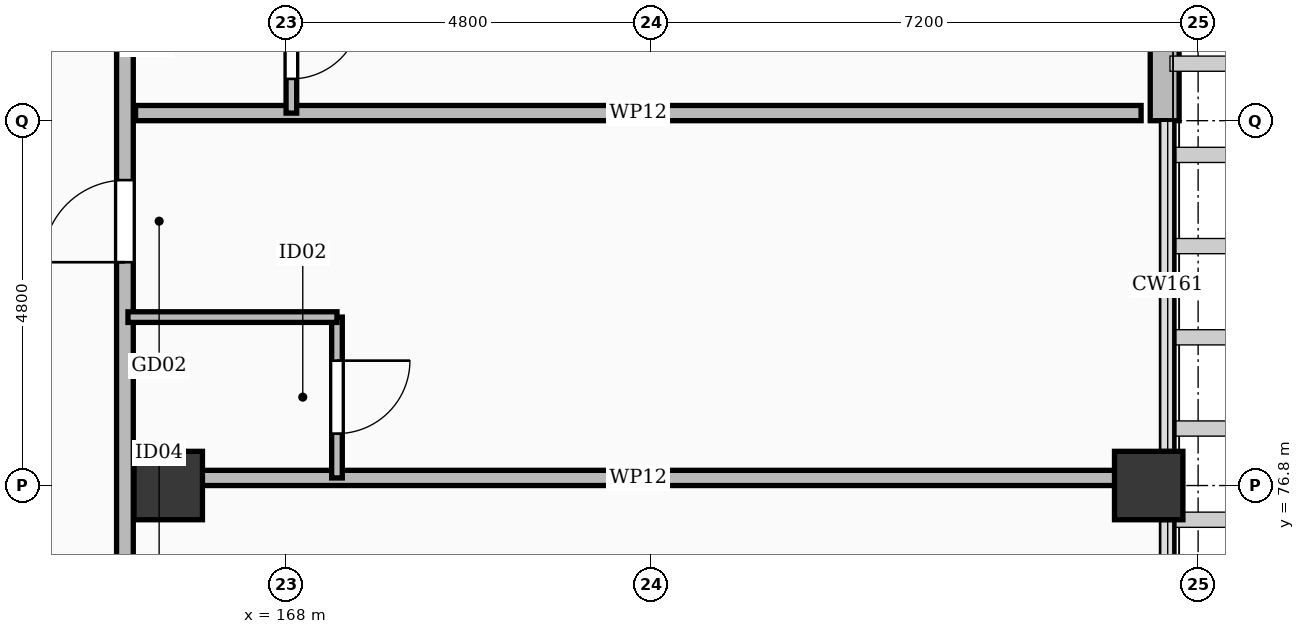
"""IFC4 building model, lengths in metres.
Left out: names, types, materials, properties, quantities, classifications, styles, units other than length and angle.
Written with IfcOpenShell. Run it as: python <this file> out.ifc"""

import sys

from ifc_helpers import new_model, si_unit, direction, frame, frame_2d, origin, origin_2d, place, context, subcontext, project, spatial, rectangle, extrude, element, fill, save


model = new_model("IFC4")
c1 = context("Model", 3, precision=1e-05, world=origin(), true_north=direction((0.0, 1.0)))
c2 = subcontext(c1, "Body", "Model", "MODEL_VIEW")
j1 = project(units=[si_unit("LENGTHUNIT", "METRE"), si_unit("PLANEANGLEUNIT", "RADIAN")], contexts=[c1])
p1 = place(None, origin())
s1 = spatial("IfcSite", under=j1, at=p1, CompositionType="ELEMENT")
p2 = place(p1, origin())
s2 = spatial("IfcBuilding", under=s1, at=p2, CompositionType="ELEMENT")
p3 = place(p2, frame((0.0, 0.0, 16.2)))
s3 = spatial("IfcBuildingStorey", under=s2, at=p3, CompositionType="ELEMENT", Elevation=16.2)
for number, where, z_axis, x_axis in (
    (1, (166.45, 76.8, 0.0), (0.0, 0.0, 1.0), (1.0, 0.0, 0.0)),
    (2, (179.35, 76.8, 0.0), (0.0, 0.0, 1.0), (1.0, 0.0, 0.0)),
):
    element("IfcColumn", number, at=place(p3, frame(where, z_axis=z_axis, x_axis=x_axis)), inside=s3, PredefinedType="COLUMN", context=c2, shape_type="SweptSolid", body=[
        extrude(rectangle(XDim=0.9, YDim=0.9, at=origin_2d()), origin(), (0.0, 0.0, 1.0), 4.8),
    ])
p4 = place(p3, frame((179.56, 85.975, 0.0), z_axis=(0.0, 0.0, 1.0), x_axis=(0.0, -1.0, 0.0)))
e3 = element("IfcWall", 3, at=p4, inside=s3, PredefinedType="SOLIDWALL", context=c2, shape_type="SweptSolid", body=[
    extrude(rectangle(XDim=4.375, YDim=0.38, at=frame_2d((2.188, 0.0))), origin(), (0.0, 0.0, 1.0), 3.032),
])
p5 = place(p4, frame((1.403, 0.0, 0.55)))
e4 = element("IfcOpeningElement", 4, at=p5, cuts=e3, PredefinedType="OPENING", context=c2, shape_type="SweptSolid", body=[
    extrude(rectangle(XDim=1.5, YDim=1.74, at=frame_2d((0.75, 0.87))), frame((0.0, 0.202, 0.0), z_axis=(0.0, -1.0, 0.0), x_axis=(1.0, 0.0, 0.0)), (0.0, 0.0, 1.0), 0.404),
])
p6 = place(p3, frame((165.88, 65.4, 0.0), z_axis=(0.0, 0.0, 1.0), x_axis=(0.0, 1.0, 0.0)))
e5 = element("IfcWall", 5, at=p6, inside=s3, PredefinedType="PARTITIONING", context=c2, shape_type="SweptSolid", body=[
    extrude(rectangle(XDim=60.25, YDim=0.22, at=frame_2d((30.125, 0.0))), origin(), (0.0, 0.0, 1.0), 3.732),
])
p7 = place(p6, frame((4.738, 0.0, 0.0)))
e6 = element("IfcOpeningElement", 6, at=p7, cuts=e5, PredefinedType="OPENING", context=c2, shape_type="SweptSolid", body=[
    extrude(rectangle(XDim=1.28, YDim=2.16, at=frame_2d((0.64, 1.08))), frame((0.0, 0.122, 0.0), z_axis=(0.0, -1.0, 0.0), x_axis=(1.0, 0.0, 0.0)), (0.0, 0.0, 1.0), 0.244),
])
p8 = place(p6, frame((9.405, 0.0, 0.0)))
e7 = element("IfcOpeningElement", 7, at=p8, cuts=e5, PredefinedType="OPENING", context=c2, shape_type="SweptSolid", body=[
    extrude(rectangle(XDim=1.05, YDim=2.18, at=frame_2d((0.525, 1.09))), frame((0.0, 0.122, 0.0), z_axis=(0.0, -1.0, 0.0), x_axis=(1.0, 0.0, 0.0)), (0.0, 0.0, 1.0), 0.244),
])
p9 = place(p6, frame((14.338, 0.0, 0.0)))
e8 = element("IfcOpeningElement", 8, at=p9, cuts=e5, PredefinedType="OPENING", context=c2, shape_type="SweptSolid", body=[
    extrude(rectangle(XDim=1.08, YDim=2.25, at=frame_2d((0.54, 1.125))), frame((0.0, 0.122, 0.0), z_axis=(0.0, -1.0, 0.0), x_axis=(1.0, 0.0, 0.0)), (0.0, 0.0, 1.0), 0.244),
])
p10 = place(p6, frame((19.005, 0.0, 0.0)))
e9 = element("IfcOpeningElement", 9, at=p10, cuts=e5, PredefinedType="OPENING", context=c2, shape_type="SweptSolid", body=[
    extrude(rectangle(XDim=1.02, YDim=2.2, at=frame_2d((0.51, 1.1))), frame((0.0, 0.122, 0.0), z_axis=(0.0, -1.0, 0.0), x_axis=(1.0, 0.0, 0.0)), (0.0, 0.0, 1.0), 0.244),
])
p11 = place(p6, frame((23.938, 0.0, 0.0)))
e10 = element("IfcOpeningElement", 10, at=p11, cuts=e5, PredefinedType="OPENING", context=c2, shape_type="SweptSolid", body=[
    extrude(rectangle(XDim=1.5, YDim=2.3, at=frame_2d((0.75, 1.15))), frame((0.0, 0.122, 0.0), z_axis=(0.0, -1.0, 0.0), x_axis=(1.0, 0.0, 0.0)), (0.0, 0.0, 1.0), 0.244),
])
p12 = place(p6, frame((28.605, 0.0, 0.0)))
e11 = element("IfcOpeningElement", 11, at=p12, cuts=e5, PredefinedType="OPENING", context=c2, shape_type="SweptSolid", body=[
    extrude(rectangle(XDim=1.12, YDim=2.15, at=frame_2d((0.56, 1.075))), frame((0.0, 0.122, 0.0), z_axis=(0.0, -1.0, 0.0), x_axis=(1.0, 0.0, 0.0)), (0.0, 0.0, 1.0), 0.244),
])
p13 = place(p6, frame((33.538, 0.0, 0.0)))
e12 = element("IfcOpeningElement", 12, at=p13, cuts=e5, PredefinedType="OPENING", context=c2, shape_type="SweptSolid", body=[
    extrude(rectangle(XDim=1.28, YDim=2.16, at=frame_2d((0.64, 1.08))), frame((0.0, 0.122, 0.0), z_axis=(0.0, -1.0, 0.0), x_axis=(1.0, 0.0, 0.0)), (0.0, 0.0, 1.0), 0.244),
])
p14 = place(p6, frame((38.205, 0.0, 0.0)))
e13 = element("IfcOpeningElement", 13, at=p14, cuts=e5, PredefinedType="OPENING", context=c2, shape_type="SweptSolid", body=[
    extrude(rectangle(XDim=1.05, YDim=2.18, at=frame_2d((0.525, 1.09))), frame((0.0, 0.122, 0.0), z_axis=(0.0, -1.0, 0.0), x_axis=(1.0, 0.0, 0.0)), (0.0, 0.0, 1.0), 0.244),
])
p15 = place(p6, frame((43.138, 0.0, 0.0)))
e14 = element("IfcOpeningElement", 14, at=p15, cuts=e5, PredefinedType="OPENING", context=c2, shape_type="SweptSolid", body=[
    extrude(rectangle(XDim=1.08, YDim=2.25, at=frame_2d((0.54, 1.125))), frame((0.0, 0.122, 0.0), z_axis=(0.0, -1.0, 0.0), x_axis=(1.0, 0.0, 0.0)), (0.0, 0.0, 1.0), 0.244),
])
p16 = place(p6, frame((47.805, 0.0, 0.0)))
e15 = element("IfcOpeningElement", 15, at=p16, cuts=e5, PredefinedType="OPENING", context=c2, shape_type="SweptSolid", body=[
    extrude(rectangle(XDim=1.02, YDim=2.2, at=frame_2d((0.51, 1.1))), frame((0.0, 0.122, 0.0), z_axis=(0.0, -1.0, 0.0), x_axis=(1.0, 0.0, 0.0)), (0.0, 0.0, 1.0), 0.244),
])
p17 = place(p6, frame((52.738, 0.0, 0.0)))
e16 = element("IfcOpeningElement", 16, at=p17, cuts=e5, PredefinedType="OPENING", context=c2, shape_type="SweptSolid", body=[
    extrude(rectangle(XDim=1.5, YDim=2.3, at=frame_2d((0.75, 1.15))), frame((0.0, 0.122, 0.0), z_axis=(0.0, -1.0, 0.0), x_axis=(1.0, 0.0, 0.0)), (0.0, 0.0, 1.0), 0.244),
])
p18 = place(p6, frame((57.405, 0.0, 0.0)))
e17 = element("IfcOpeningElement", 17, at=p18, cuts=e5, PredefinedType="OPENING", context=c2, shape_type="SweptSolid", body=[
    extrude(rectangle(XDim=1.12, YDim=2.15, at=frame_2d((0.56, 1.075))), frame((0.0, 0.122, 0.0), z_axis=(0.0, -1.0, 0.0), x_axis=(1.0, 0.0, 0.0)), (0.0, 0.0, 1.0), 0.244),
])
p19 = place(p3, frame((166.02, 76.9, 0.0), z_axis=(0.0, 0.0, 1.0), x_axis=(1.0, 0.0, 0.0)))
e18 = element("IfcWall", 18, at=p19, inside=s3, PredefinedType="PARTITIONING", context=c2, shape_type="SweptSolid", body=[
    extrude(rectangle(XDim=13.23, YDim=0.2, at=frame_2d((6.615, 0.0))), origin(), (0.0, 0.0, 1.0), 3.032),
])
p20 = place(p3, frame((168.67, 76.9, 0.0), z_axis=(0.0, 0.0, 1.0), x_axis=(0.0, 1.0, 0.0)))
e19 = element("IfcWall", 19, at=p20, inside=s3, PredefinedType="PARTITIONING", context=c2, shape_type="SweptSolid", body=[
    extrude(rectangle(XDim=2.116, YDim=0.14, at=frame_2d((1.058, 0.0))), origin(), (0.0, 0.0, 1.0), 3.732),
])
p21 = place(p20, frame((0.583, 0.0, 0.0)))
e20 = element("IfcOpeningElement", 20, at=p21, cuts=e19, PredefinedType="OPENING", context=c2, shape_type="SweptSolid", body=[
    extrude(rectangle(XDim=0.96, YDim=2.12, at=frame_2d((0.48, 1.06))), frame((0.0, 0.082, 0.0), z_axis=(0.0, -1.0, 0.0), x_axis=(1.0, 0.0, 0.0)), (0.0, 0.0, 1.0), 0.164),
])
p22 = place(p3, frame((165.92, 79.016, 0.0), z_axis=(0.0, 0.0, 1.0), x_axis=(1.0, 0.0, 0.0)))
e21 = element("IfcWall", 21, at=p22, inside=s3, PredefinedType="PARTITIONING", context=c2, shape_type="SweptSolid", body=[
    extrude(rectangle(XDim=2.75, YDim=0.14, at=frame_2d((1.375, 0.0))), origin(), (0.0, 0.0, 1.0), 3.132),
])
p23 = place(p3, frame((166.02, 81.7, 0.0), z_axis=(0.0, 0.0, 1.0), x_axis=(1.0, 0.0, 0.0)))
e22 = element("IfcWall", 22, at=p23, inside=s3, PredefinedType="PARTITIONING", context=c2, shape_type="SweptSolid", body=[
    extrude(rectangle(XDim=13.23, YDim=0.2, at=frame_2d((6.615, 0.0))), origin(), (0.0, 0.0, 1.0), 3.032),
])
p24 = place(p3, frame((168.07, 81.7, 0.0), z_axis=(0.0, 0.0, 1.0), x_axis=(0.0, 1.0, 0.0)))
e23 = element("IfcWall", 23, at=p24, inside=s3, PredefinedType="PARTITIONING", context=c2, shape_type="SweptSolid", body=[
    extrude(rectangle(XDim=1.85, YDim=0.14, at=frame_2d((0.925, 0.0))), origin(), (0.0, 0.0, 1.0), 4.54),
])
p25 = place(p24, frame((0.45, 0.0, 0.0)))
e24 = element("IfcOpeningElement", 24, at=p25, cuts=e23, PredefinedType="OPENING", context=c2, shape_type="SweptSolid", body=[
    extrude(rectangle(XDim=0.92, YDim=2.1, at=frame_2d((0.46, 1.05))), frame((0.0, 0.082, 0.0), z_axis=(0.0, -1.0, 0.0), x_axis=(1.0, 0.0, 0.0)), (0.0, 0.0, 1.0), 0.164),
])
p26 = place(p9, origin())
e25 = element("IfcDoor", 25, at=p26, inside=s3, OperationType="SINGLE_SWING_LEFT", PredefinedType="DOOR", context=c2, shape_type="SweptSolid", body=[
    extrude(rectangle(XDim=1.08, YDim=2.25, at=frame_2d((0.54, 1.125))), frame((0.0, 0.025, 0.0), z_axis=(0.0, -1.0, 0.0), x_axis=(1.0, 0.0, 0.0)), (0.0, 0.0, 1.0), 0.05),
])
fill(e8, e25)
p27 = place(p21, frame((0.96, 0.0, 0.0), z_axis=(0.0, 0.0, 1.0), x_axis=(-1.0, 0.0, 0.0)))
e26 = element("IfcDoor", 26, at=p27, inside=s3, OperationType="SINGLE_SWING_RIGHT", PredefinedType="DOOR", context=c2, shape_type="SweptSolid", body=[
    extrude(rectangle(XDim=0.96, YDim=2.12, at=frame_2d((0.48, 1.06))), frame((0.0, 0.025, 0.0), z_axis=(0.0, -1.0, 0.0), x_axis=(1.0, 0.0, 0.0)), (0.0, 0.0, 1.0), 0.05),
])
fill(e20, e26)
p28 = place(p25, frame((0.92, 0.0, 0.0), z_axis=(0.0, 0.0, 1.0), x_axis=(-1.0, 0.0, 0.0)))
e27 = element("IfcDoor", 27, at=p28, inside=s3, OperationType="SINGLE_SWING_RIGHT", PredefinedType="DOOR", context=c2, shape_type="SweptSolid", body=[
    extrude(rectangle(XDim=0.92, YDim=2.1, at=frame_2d((0.46, 1.05))), frame((0.0, 0.025, 0.0), z_axis=(0.0, -1.0, 0.0), x_axis=(1.0, 0.0, 0.0)), (0.0, 0.0, 1.0), 0.05),
])
fill(e24, e27)
save(model, sys.argv[1])
